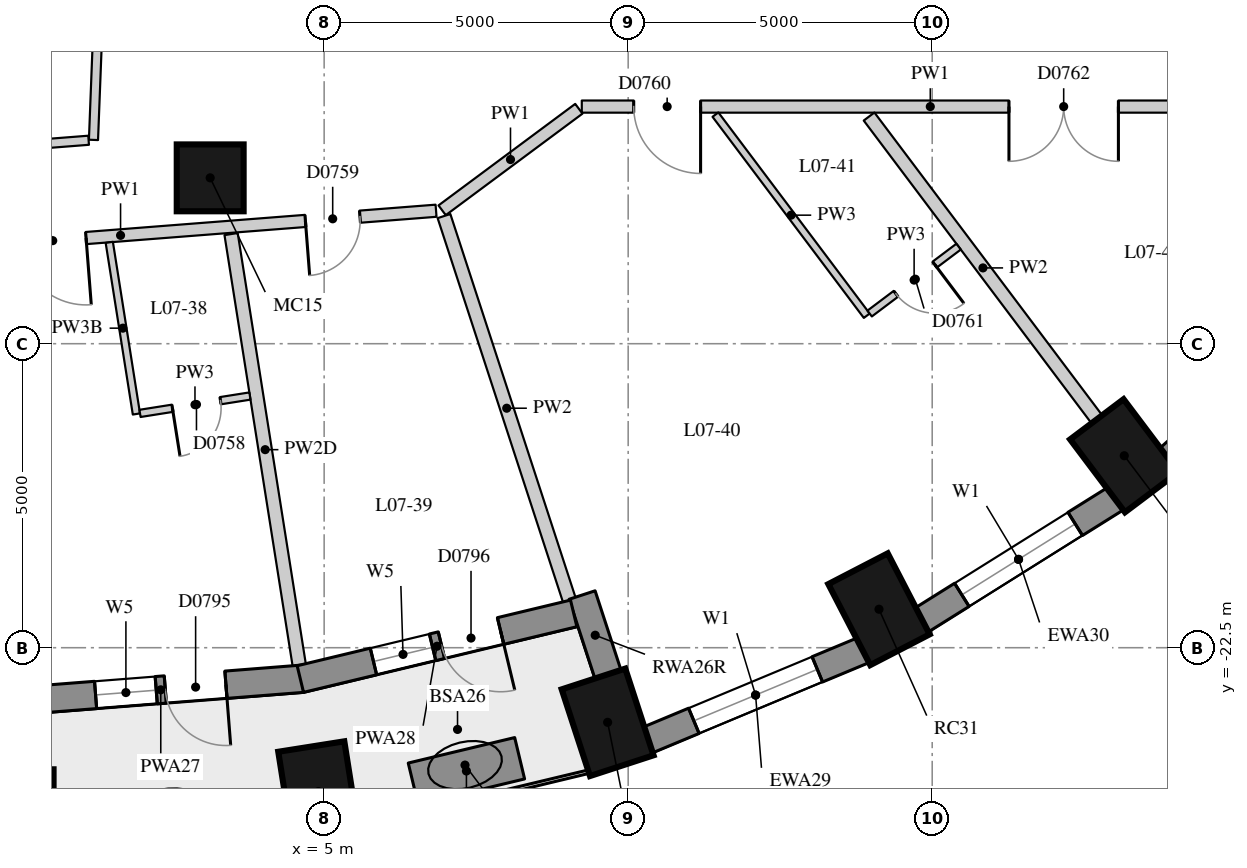
"""IFC4 building model, lengths in metres.
Left out: names, types, materials, properties, quantities, classifications, styles, units other than length and angle.
Written with IfcOpenShell. Run it as: python <this file> out.ifc"""

import sys

from ifc_helpers import new_model, si_unit, direction, frame, frame_2d, origin, origin_2d, place, context, subcontext, project, spatial, rectangle, extrude, element, fill, save


model = new_model("IFC4")
c1 = context("Model", 3, precision=1e-05, world=origin(), true_north=direction((0.0, 1.0)))
c2 = subcontext(c1, "Body", "Model", "MODEL_VIEW")
j1 = project(units=[si_unit("LENGTHUNIT", "METRE"), si_unit("PLANEANGLEUNIT", "RADIAN")], contexts=[c1])
p1 = place(None, origin())
s1 = spatial("IfcSite", under=j1, at=p1, CompositionType="ELEMENT")
p2 = place(p1, origin())
s2 = spatial("IfcBuilding", under=s1, at=p2, CompositionType="ELEMENT")
p3 = place(p2, frame((0.0, 0.0, 31.6)))
s3 = spatial("IfcBuildingStorey", under=s2, at=p3, CompositionType="ELEMENT", Elevation=31.6)
for number, where, z_axis, x_axis in (
    (1, (0.0, -25.25, 0.0), (0.0, 0.0, 1.0), (0.0, -1.0, 0.0)),
    (2, (4.906, -24.866, 0.0), (0.0, 0.0, 1.0), (0.156, -0.988, 0.0)),
    (3, (9.662, -23.727, 0.0), (0.0, 0.0, 1.0), (0.31, -0.951, 0.0)),
    (4, (14.125, -21.867, 0.0), (0.0, 0.0, 1.0), (0.46, -0.888, 0.0)),
    (5, (18.159, -19.343, 0.0), (0.0, 0.0, 1.0), (0.601, -0.799, 0.0)),
):
    element("IfcColumn", number, at=place(p3, frame(where, z_axis=z_axis, x_axis=x_axis)), inside=s3, PredefinedType="COLUMN", context=c2, shape_type="SweptSolid", body=[
        extrude(rectangle(XDim=1.5, YDim=1.1, at=origin_2d()), origin(), (0.0, 0.0, 1.0), 3.3),
    ])
p4 = place(p3, frame((3.126, -14.772, 0.0), z_axis=(0.0, 0.0, 1.0), x_axis=(1.0, 0.0, 0.0)))
e6 = element("IfcColumn", 6, at=p4, inside=s3, PredefinedType="COLUMN", context=c2, shape_type="SweptSolid", body=[
    extrude(rectangle(XDim=1.1, YDim=1.1, at=origin_2d()), origin(), (0.0, 0.0, 1.0), 3.3),
])
p5 = place(p3, frame((10.315, -24.021, 0.0), z_axis=(0.0, 0.0, 1.0), x_axis=(0.923031964282, 0.384723267966, 0.0)))
e7 = element("IfcWall", 7, at=p5, inside=s3, PredefinedType="SOLIDWALL", context=c2, shape_type="SweptSolid", body=[
    extrude(rectangle(XDim=3.856, YDim=0.45, at=frame_2d((1.928, 0.0))), origin(), (0.0, 0.0, 1.0), 3.02),
])
p6 = place(p5, frame((0.828, 0.0, 0.4)))
e8 = element("IfcOpeningElement", 8, at=p6, cuts=e7, PredefinedType="OPENING", context=c2, shape_type="SweptSolid", body=[
    extrude(rectangle(XDim=2.2, YDim=1.75, at=frame_2d((1.1, 0.875))), frame((0.0, 0.235, 0.0), z_axis=(0.0, -1.0, 0.0), x_axis=(1.0, 0.0, 0.0)), (0.0, 0.0, 1.0), 0.47),
])
p7 = place(p3, frame((14.817, -22.051, 0.0), z_axis=(0.0, 0.0, 1.0), x_axis=(0.847635480093, 0.530579016629, 0.0)))
e9 = element("IfcWall", 9, at=p7, inside=s3, PredefinedType="SOLIDWALL", context=c2, shape_type="SweptSolid", body=[
    extrude(rectangle(XDim=3.782, YDim=0.45, at=frame_2d((1.891, 0.0))), origin(), (0.0, 0.0, 1.0), 3.02),
])
p8 = place(p7, frame((0.791, 0.0, 0.4)))
e10 = element("IfcOpeningElement", 10, at=p8, cuts=e9, PredefinedType="OPENING", context=c2, shape_type="SweptSolid", body=[
    extrude(rectangle(XDim=2.2, YDim=1.75, at=frame_2d((1.1, 0.875))), frame((0.0, 0.235, 0.0), z_axis=(0.0, -1.0, 0.0), x_axis=(1.0, 0.0, 0.0)), (0.0, 0.0, 1.0), 0.47),
])
p9 = place(p3, frame((18.871, -19.407, 0.0), z_axis=(0.0, 0.0, 1.0), x_axis=(0.745526233716, 0.66647628228, 0.0)))
e11 = element("IfcWall", 11, at=p9, inside=s3, PredefinedType="SOLIDWALL", context=c2, shape_type="SweptSolid", body=[
    extrude(rectangle(XDim=3.697, YDim=0.45, at=frame_2d((1.848, 0.0))), origin(), (0.0, 0.0, 1.0), 3.02),
])
p10 = place(p3, frame((9.674, -22.956, 0.0), z_axis=(0.0, 0.0, 1.0), x_axis=(-0.310269011655, 0.950648799719, 0.0)))
e12 = element("IfcWall", 12, at=p10, inside=s3, PredefinedType="SOLIDWALL", context=c2, shape_type="SweptSolid", body=[
    extrude(rectangle(XDim=1.39, YDim=0.45, at=frame_2d((0.695, 0.0))), origin(), (0.0, 0.0, 1.0), 3.02),
])
p11 = place(p3, frame((-0.018, -23.376, 0.0), z_axis=(0.0, 0.0, 1.0), x_axis=(0.996935982964, 0.078221773648, 0.0)))
e13 = element("IfcWall", 13, at=p11, inside=s3, PredefinedType="SOLIDWALL", context=c2, shape_type="SweptSolid", body=[
    extrude(rectangle(XDim=4.676, YDim=0.45, at=frame_2d((2.338, 0.0))), origin(), (0.0, 0.0, 1.0), 3.02),
])
p12 = place(p11, frame((1.263, 0.0, 0.4)))
e14 = element("IfcOpeningElement", 14, at=p12, cuts=e13, PredefinedType="OPENING", context=c2, shape_type="SweptSolid", body=[
    extrude(rectangle(XDim=1.0, YDim=1.75, at=frame_2d((0.5, 0.875))), frame((0.0, 0.235, 0.0), z_axis=(0.0, -1.0, 0.0), x_axis=(1.0, 0.0, 0.0)), (0.0, 0.0, 1.0), 0.47),
])
p13 = place(p11, frame((2.413, 0.0, 0.0)))
e15 = element("IfcOpeningElement", 15, at=p13, cuts=e13, PredefinedType="OPENING", context=c2, shape_type="SweptSolid", body=[
    extrude(rectangle(XDim=1.0, YDim=2.15, at=frame_2d((0.5, 1.075))), frame((0.0, 0.235, 0.0), z_axis=(0.0, -1.0, 0.0), x_axis=(1.0, 0.0, 0.0)), (0.0, 0.0, 1.0), 0.47),
])
p14 = place(p3, frame((4.608, -23.016, 0.0), z_axis=(0.0, 0.0, 1.0), x_axis=(0.972343667289, 0.233554688847, 0.0)))
e16 = element("IfcWall", 16, at=p14, inside=s3, PredefinedType="SOLIDWALL", context=c2, shape_type="SweptSolid", body=[
    extrude(rectangle(XDim=4.624, YDim=0.45, at=frame_2d((2.312, 0.0))), origin(), (0.0, 0.0, 1.0), 3.02),
])
p15 = place(p14, frame((1.237, 0.0, 0.4)))
e17 = element("IfcOpeningElement", 17, at=p15, cuts=e16, PredefinedType="OPENING", context=c2, shape_type="SweptSolid", body=[
    extrude(rectangle(XDim=1.0, YDim=1.75, at=frame_2d((0.5, 0.875))), frame((0.0, 0.235, 0.0), z_axis=(0.0, -1.0, 0.0), x_axis=(1.0, 0.0, 0.0)), (0.0, 0.0, 1.0), 0.47),
])
p16 = place(p14, frame((2.387, 0.0, 0.0)))
e18 = element("IfcOpeningElement", 18, at=p16, cuts=e16, PredefinedType="OPENING", context=c2, shape_type="SweptSolid", body=[
    extrude(rectangle(XDim=1.0, YDim=2.15, at=frame_2d((0.5, 1.075))), frame((0.0, 0.235, 0.0), z_axis=(0.0, -1.0, 0.0), x_axis=(1.0, 0.0, 0.0)), (0.0, 0.0, 1.0), 0.47),
])
p17 = place(p3, frame((6.465, -24.737, 0.0), z_axis=(0.0, 0.0, 1.0), x_axis=(0.972504142103, 0.232885580473, 0.0)))
e19 = element("IfcWall", 19, at=p17, inside=s3, PredefinedType="USERDEFINED", context=c2, shape_type="SweptSolid", body=[
    extrude(rectangle(XDim=1.8, YDim=0.7, at=frame_2d((0.9, 0.0))), origin(), (0.0, 0.0, 1.0), 0.75),
])
p18 = place(p3, frame((20.7, -13.6, 0.0), z_axis=(0.0, 0.0, 1.0), x_axis=(-1.0, 0.0, 0.0)))
e20 = element("IfcWall", 20, at=p18, inside=s3, PredefinedType="PARTITIONING", context=c2, shape_type="SweptSolid", body=[
    extrude(rectangle(XDim=11.463, YDim=0.2, at=frame_2d((5.731, 0.0))), origin(), (0.0, 0.0, 1.0), 3.02),
])
p19 = place(p18, frame((9.509, 0.0, 0.0)))
e21 = element("IfcOpeningElement", 21, at=p19, cuts=e20, PredefinedType="OPENING", context=c2, shape_type="SweptSolid", body=[
    extrude(rectangle(XDim=1.1, YDim=2.1, at=frame_2d((0.55, 1.05))), frame((0.0, 0.11, 0.0), z_axis=(0.0, -1.0, 0.0), x_axis=(1.0, 0.0, 0.0)), (0.0, 0.0, 1.0), 0.22),
])
p20 = place(p18, frame((2.638, 0.0, 0.0)))
e22 = element("IfcOpeningElement", 22, at=p20, cuts=e20, PredefinedType="OPENING", context=c2, shape_type="SweptSolid", body=[
    extrude(rectangle(XDim=1.8, YDim=2.1, at=frame_2d((0.9, 1.05))), frame((0.0, 0.11, 0.0), z_axis=(0.0, -1.0, 0.0), x_axis=(1.0, 0.0, 0.0)), (0.0, 0.0, 1.0), 0.22),
])
p21 = place(p3, frame((9.189, -13.636, 0.0), z_axis=(0.0, 0.0, 1.0), x_axis=(-0.8028261118, -0.596213245586, 0.0)))
e23 = element("IfcWall", 23, at=p21, inside=s3, PredefinedType="PARTITIONING", context=c2, shape_type="SweptSolid", body=[
    extrude(rectangle(XDim=2.801, YDim=0.2, at=frame_2d((1.4, 0.0))), origin(), (0.0, 0.0, 1.0), 3.02),
])
p22 = place(p3, frame((6.84, -15.313, 0.0), z_axis=(0.0, 0.0, 1.0), x_axis=(-0.996968882229, -0.077801335898, 0.0)))
e24 = element("IfcWall", 24, at=p22, inside=s3, PredefinedType="PARTITIONING", context=c2, shape_type="SweptSolid", body=[
    extrude(rectangle(XDim=10.409, YDim=0.2, at=frame_2d((5.204, 0.0))), origin(), (0.0, 0.0, 1.0), 3.02),
])
p23 = place(p22, frame((5.773, 0.0, 0.0)))
e25 = element("IfcOpeningElement", 25, at=p23, cuts=e24, PredefinedType="OPENING", context=c2, shape_type="SweptSolid", body=[
    extrude(rectangle(XDim=1.1, YDim=2.1, at=frame_2d((0.55, 1.05))), frame((0.0, 0.11, 0.0), z_axis=(0.0, -1.0, 0.0), x_axis=(1.0, 0.0, 0.0)), (0.0, 0.0, 1.0), 0.22),
])
p24 = place(p22, frame((1.255, 0.0, 0.0)))
e26 = element("IfcOpeningElement", 26, at=p24, cuts=e24, PredefinedType="OPENING", context=c2, shape_type="SweptSolid", body=[
    extrude(rectangle(XDim=0.9, YDim=2.1, at=frame_2d((0.45, 1.05))), frame((0.0, 0.11, 0.0), z_axis=(0.0, -1.0, 0.0), x_axis=(1.0, 0.0, 0.0)), (0.0, 0.0, 1.0), 0.22),
])
p25 = place(p3, frame((1.397, -9.23, 0.0), z_axis=(0.0, 0.0, 1.0), x_axis=(-0.038741742932, -0.99924925687, 0.0)))
e27 = element("IfcWall", 27, at=p25, inside=s3, PredefinedType="PARTITIONING", context=c2, shape_type="SweptSolid", body=[
    extrude(rectangle(XDim=4.922, YDim=0.15, at=frame_2d((2.461, 0.0))), origin(), (0.0, 0.0, 1.0), 3.02),
])
p26 = place(p3, frame((1.126, -14.154, 0.0), z_axis=(0.0, 0.0, 1.0), x_axis=(-0.996959190057, -0.077925434624, 0.0)))
e28 = element("IfcWall", 28, at=p26, inside=s3, PredefinedType="PARTITIONING", context=c2, shape_type="SweptSolid", body=[
    extrude(rectangle(XDim=2.309, YDim=0.15, at=frame_2d((1.155, 0.0))), origin(), (0.0, 0.0, 1.0), 2.42),
])
p27 = place(p3, frame((4.591, -22.789, 0.0), z_axis=(0.0, 0.0, 1.0), x_axis=(-0.156144168019, 0.987734275397, 0.0)))
e29 = element("IfcWall", 29, at=p27, inside=s3, PredefinedType="PARTITIONING", context=c2, shape_type="SweptSolid", body=[
    extrude(rectangle(XDim=7.18, YDim=0.22, at=frame_2d((3.59, 0.0))), origin(), (0.0, 0.0, 1.0), 2.47),
])
p28 = place(p3, frame((9.034, -21.721, 0.0), z_axis=(0.0, 0.0, 1.0), x_axis=(-0.31029478083, 0.95064038889, 0.0)))
e30 = element("IfcWall", 30, at=p28, inside=s3, PredefinedType="PARTITIONING", context=c2, shape_type="SweptSolid", body=[
    extrude(rectangle(XDim=6.648, YDim=0.22, at=frame_2d((3.324, 0.0))), origin(), (0.0, 0.0, 1.0), 3.02),
])
p29 = place(p3, frame((17.708, -18.743, 0.0), z_axis=(0.0, 0.0, 1.0), x_axis=(-0.601177883261, 0.799115231164, 0.0)))
e31 = element("IfcWall", 31, at=p29, inside=s3, PredefinedType="PARTITIONING", context=c2, shape_type="SweptSolid", body=[
    extrude(rectangle(XDim=6.231, YDim=0.22, at=frame_2d((3.116, 0.0))), origin(), (0.0, 0.0, 1.0), 3.02),
])
p30 = place(p3, frame((1.466, -15.833, 0.0), z_axis=(0.0, 0.0, 1.0), x_axis=(0.156164367571, -0.987731081976, 0.0)))
e32 = element("IfcWall", 32, at=p30, inside=s3, PredefinedType="PARTITIONING", context=c2, shape_type="SweptSolid", body=[
    extrude(rectangle(XDim=2.858, YDim=0.12, at=frame_2d((1.429, 0.0))), origin(), (0.0, 0.0, 1.0), 2.47),
])
p31 = place(p3, frame((11.435, -13.732, 0.0), z_axis=(0.0, 0.0, 1.0), x_axis=(0.601178939522, -0.799114436533, 0.0)))
e33 = element("IfcWall", 33, at=p31, inside=s3, PredefinedType="PARTITIONING", context=c2, shape_type="SweptSolid", body=[
    extrude(rectangle(XDim=4.139, YDim=0.12, at=frame_2d((2.07, 0.0))), origin(), (0.0, 0.0, 1.0), 3.02),
])
p32 = place(p3, frame((1.972, -18.646, 0.0), z_axis=(0.0, 0.0, 1.0), x_axis=(0.98774348746, 0.156085883351, 0.0)))
e34 = element("IfcWall", 34, at=p32, inside=s3, PredefinedType="PARTITIONING", context=c2, shape_type="SweptSolid", body=[
    extrude(rectangle(XDim=1.83, YDim=0.12, at=frame_2d((0.915, 0.0))), origin(), (0.0, 0.0, 1.0), 3.02),
])
p33 = place(p32, frame((0.54, 0.0, 0.0)))
e35 = element("IfcOpeningElement", 35, at=p33, cuts=e34, PredefinedType="OPENING", context=c2, shape_type="SweptSolid", body=[
    extrude(rectangle(XDim=0.8, YDim=2.1, at=frame_2d((0.4, 1.05))), frame((0.0, 0.07, 0.0), z_axis=(0.0, -1.0, 0.0), x_axis=(1.0, 0.0, 0.0)), (0.0, 0.0, 1.0), 0.14),
])
p34 = place(p3, frame((13.971, -17.004, 0.0), z_axis=(0.0, 0.0, 1.0), x_axis=(0.799231057954, 0.60102388971, 0.0)))
e36 = element("IfcWall", 36, at=p34, inside=s3, PredefinedType="PARTITIONING", context=c2, shape_type="SweptSolid", body=[
    extrude(rectangle(XDim=1.83, YDim=0.12, at=frame_2d((0.915, 0.0))), origin(), (0.0, 0.0, 1.0), 3.02),
])
p35 = place(p34, frame((0.54, 0.0, 0.0)))
e37 = element("IfcOpeningElement", 37, at=p35, cuts=e36, PredefinedType="OPENING", context=c2, shape_type="SweptSolid", body=[
    extrude(rectangle(XDim=0.8, YDim=2.1, at=frame_2d((0.4, 1.05))), frame((0.0, 0.07, 0.0), z_axis=(0.0, -1.0, 0.0), x_axis=(1.0, 0.0, 0.0)), (0.0, 0.0, 1.0), 0.14),
])
p36 = place(p6, origin())
e38 = element("IfcWindow", 38, at=p36, inside=s3, PartitioningType="SINGLE_PANEL", PredefinedType="WINDOW", context=c2, shape_type="SweptSolid", body=[
    extrude(rectangle(XDim=2.2, YDim=1.75, at=frame_2d((1.1, 0.875))), frame((0.0, 0.035, 0.0), z_axis=(0.0, -1.0, 0.0), x_axis=(1.0, 0.0, 0.0)), (0.0, 0.0, 1.0), 0.06),
])
fill(e8, e38)
p37 = place(p8, origin())
e39 = element("IfcWindow", 39, at=p37, inside=s3, PartitioningType="SINGLE_PANEL", PredefinedType="WINDOW", context=c2, shape_type="SweptSolid", body=[
    extrude(rectangle(XDim=2.2, YDim=1.75, at=frame_2d((1.1, 0.875))), frame((0.0, 0.035, 0.0), z_axis=(0.0, -1.0, 0.0), x_axis=(1.0, 0.0, 0.0)), (0.0, 0.0, 1.0), 0.06),
])
fill(e10, e39)
p38 = place(p12, origin())
e40 = element("IfcWindow", 40, at=p38, inside=s3, PartitioningType="SINGLE_PANEL", PredefinedType="WINDOW", context=c2, shape_type="SweptSolid", body=[
    extrude(rectangle(XDim=1.0, YDim=1.75, at=frame_2d((0.5, 0.875))), frame((0.0, 0.035, 0.0), z_axis=(0.0, -1.0, 0.0), x_axis=(1.0, 0.0, 0.0)), (0.0, 0.0, 1.0), 0.06),
])
fill(e14, e40)
p39 = place(p13, frame((1.0, 0.0, 0.0), z_axis=(0.0, 0.0, 1.0), x_axis=(-1.0, 0.0, 0.0)))
e41 = element("IfcDoor", 41, at=p39, inside=s3, OperationType="SINGLE_SWING_LEFT", PredefinedType="DOOR", context=c2, shape_type="SweptSolid", body=[
    extrude(rectangle(XDim=1.0, YDim=2.15, at=frame_2d((0.5, 1.075))), frame((0.0, 0.075, 0.0), z_axis=(0.0, -1.0, 0.0), x_axis=(1.0, 0.0, 0.0)), (0.0, 0.0, 1.0), 0.05),
])
fill(e15, e41)
p40 = place(p15, origin())
e42 = element("IfcWindow", 42, at=p40, inside=s3, PartitioningType="SINGLE_PANEL", PredefinedType="WINDOW", context=c2, shape_type="SweptSolid", body=[
    extrude(rectangle(XDim=1.0, YDim=1.75, at=frame_2d((0.5, 0.875))), frame((0.0, 0.035, 0.0), z_axis=(0.0, -1.0, 0.0), x_axis=(1.0, 0.0, 0.0)), (0.0, 0.0, 1.0), 0.06),
])
fill(e17, e42)
p41 = place(p16, frame((1.0, 0.0, 0.0), z_axis=(0.0, 0.0, 1.0), x_axis=(-1.0, 0.0, 0.0)))
e43 = element("IfcDoor", 43, at=p41, inside=s3, OperationType="SINGLE_SWING_LEFT", PredefinedType="DOOR", context=c2, shape_type="SweptSolid", body=[
    extrude(rectangle(XDim=1.0, YDim=2.15, at=frame_2d((0.5, 1.075))), frame((0.0, 0.075, 0.0), z_axis=(0.0, -1.0, 0.0), x_axis=(1.0, 0.0, 0.0)), (0.0, 0.0, 1.0), 0.05),
])
fill(e18, e43)
p42 = place(p23, origin())
e44 = element("IfcDoor", 44, at=p42, inside=s3, OperationType="SINGLE_SWING_LEFT", PredefinedType="DOOR", context=c2, shape_type="SweptSolid", body=[
    extrude(rectangle(XDim=1.1, YDim=2.1, at=frame_2d((0.55, 1.05))), frame((0.0, 0.025, 0.0), z_axis=(0.0, -1.0, 0.0), x_axis=(1.0, 0.0, 0.0)), (0.0, 0.0, 1.0), 0.05),
])
fill(e25, e44)
p43 = place(p33, origin())
e45 = element("IfcDoor", 45, at=p43, inside=s3, OperationType="SINGLE_SWING_RIGHT", PredefinedType="DOOR", context=c2, shape_type="SweptSolid", body=[
    extrude(rectangle(XDim=0.8, YDim=2.1, at=frame_2d((0.4, 1.05))), frame((0.0, 0.025, 0.0), z_axis=(0.0, -1.0, 0.0), x_axis=(1.0, 0.0, 0.0)), (0.0, 0.0, 1.0), 0.05),
])
fill(e35, e45)
p44 = place(p24, origin())
e46 = element("IfcDoor", 46, at=p44, inside=s3, OperationType="SINGLE_SWING_RIGHT", PredefinedType="DOOR", context=c2, shape_type="SweptSolid", body=[
    extrude(rectangle(XDim=0.9, YDim=2.1, at=frame_2d((0.45, 1.05))), frame((0.0, 0.025, 0.0), z_axis=(0.0, -1.0, 0.0), x_axis=(1.0, 0.0, 0.0)), (0.0, 0.0, 1.0), 0.05),
])
fill(e26, e46)
p45 = place(p19, origin())
e47 = element("IfcDoor", 47, at=p45, inside=s3, OperationType="SINGLE_SWING_LEFT", PredefinedType="DOOR", context=c2, shape_type="SweptSolid", body=[
    extrude(rectangle(XDim=1.1, YDim=2.1, at=frame_2d((0.55, 1.05))), frame((0.0, 0.025, 0.0), z_axis=(0.0, -1.0, 0.0), x_axis=(1.0, 0.0, 0.0)), (0.0, 0.0, 1.0), 0.05),
])
fill(e21, e47)
p46 = place(p35, origin())
e48 = element("IfcDoor", 48, at=p46, inside=s3, OperationType="SINGLE_SWING_LEFT", PredefinedType="DOOR", context=c2, shape_type="SweptSolid", body=[
    extrude(rectangle(XDim=0.8, YDim=2.1, at=frame_2d((0.4, 1.05))), frame((0.0, 0.025, 0.0), z_axis=(0.0, -1.0, 0.0), x_axis=(1.0, 0.0, 0.0)), (0.0, 0.0, 1.0), 0.05),
])
fill(e37, e48)
p47 = place(p20, origin())
e49 = element("IfcDoor", 49, at=p47, inside=s3, OperationType="DOUBLE_DOOR_SINGLE_SWING", PredefinedType="DOOR", context=c2, shape_type="SweptSolid", body=[
    extrude(rectangle(XDim=1.8, YDim=2.1, at=frame_2d((0.9, 1.05))), frame((0.0, 0.025, 0.0), z_axis=(0.0, -1.0, 0.0), x_axis=(1.0, 0.0, 0.0)), (0.0, 0.0, 1.0), 0.05),
])
fill(e22, e49)
save(model, sys.argv[1])
